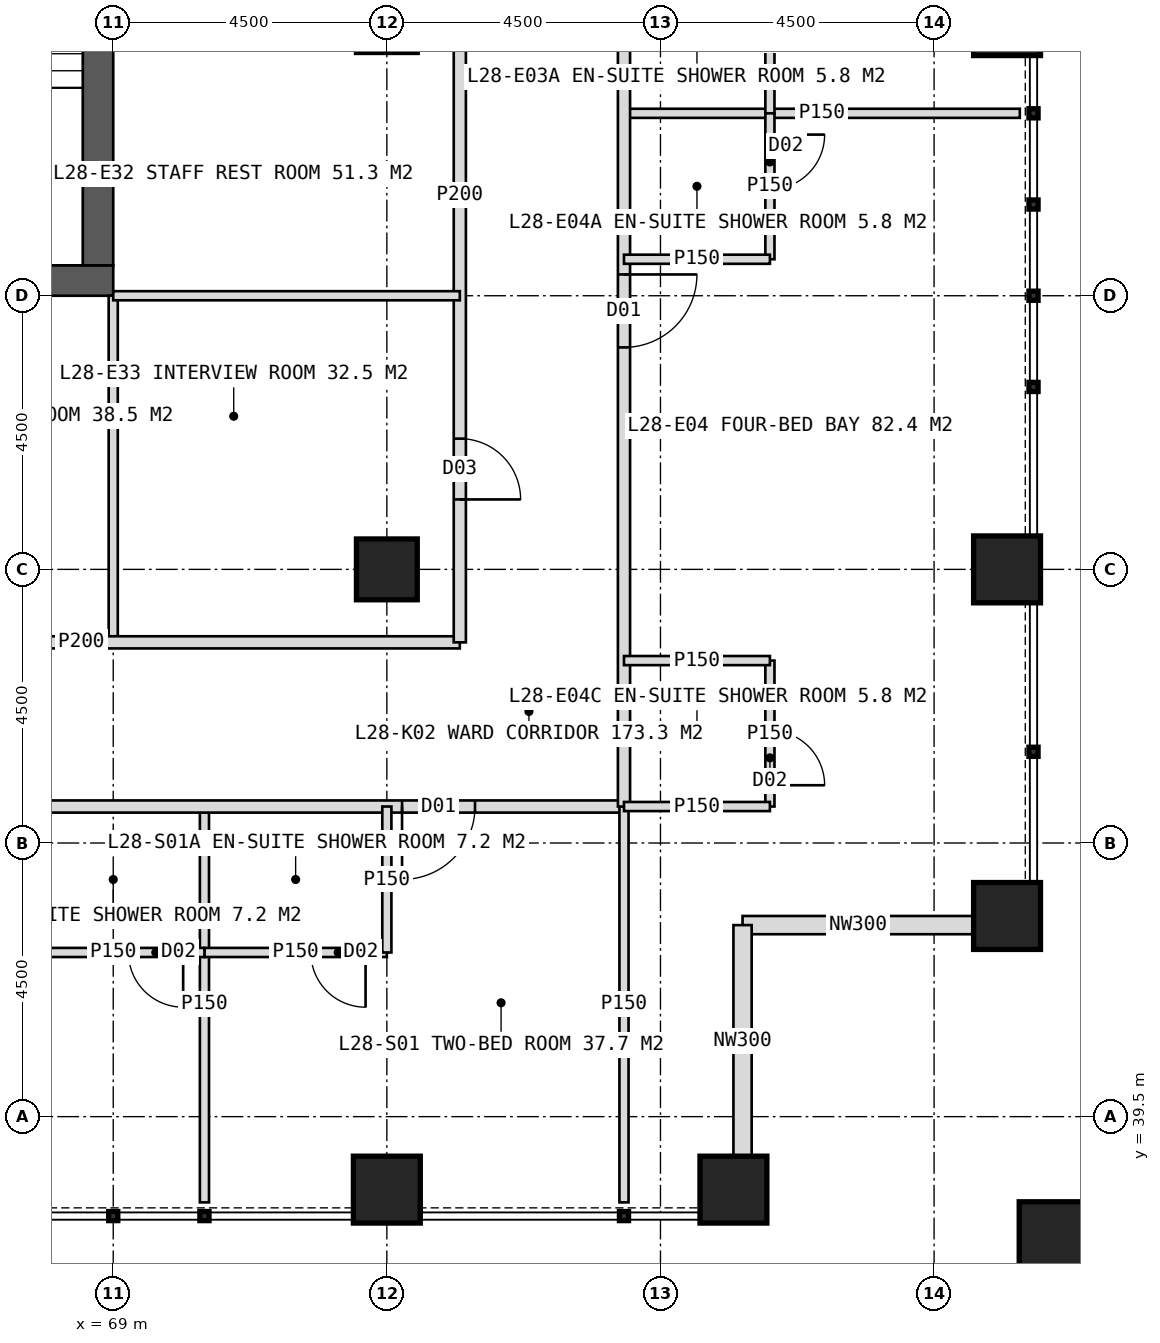
"""IFC4 building model, lengths in metres.
Left out: names, types, materials, properties, quantities, classifications, styles, units other than length and angle.
Written with IfcOpenShell. Run it as: python <this file> out.ifc"""

import sys

from ifc_helpers import new_model, si_unit, direction, frame, frame_2d, origin, origin_2d, place, context, subcontext, project, spatial, rectangle, hollow_rectangle, extrude, element, fill, save


model = new_model("IFC4")
c1 = context("Model", 3, precision=1e-05, world=origin(), true_north=direction((0.0, 1.0)))
c2 = subcontext(c1, "Body", "Model", "MODEL_VIEW")
j1 = project(units=[si_unit("LENGTHUNIT", "METRE"), si_unit("PLANEANGLEUNIT", "RADIAN")], contexts=[c1])
p1 = place(None, origin())
s1 = spatial("IfcSite", under=j1, at=p1, CompositionType="ELEMENT")
p2 = place(p1, origin())
s2 = spatial("IfcBuilding", under=s1, at=p2, CompositionType="ELEMENT")
p3 = place(p2, frame((0.0, 0.0, 120.0)))
s3 = spatial("IfcBuildingStorey", under=s2, at=p3, CompositionType="ELEMENT", Elevation=120.0)
p4 = place(p3, frame((51.0, 53.25, 0.0), z_axis=(0.0, 0.0, 1.0), x_axis=(1.0, 0.0, 0.0)))
e1 = element("IfcWall", 1, at=p4, inside=s3, PredefinedType="SHEAR", context=c2, shape_type="SweptSolid", body=[
    extrude(rectangle(XDim=18.0, YDim=0.5, at=frame_2d((9.0, 0.0))), origin(), (0.0, 0.0, 1.0), 4.0),
])
p5 = place(p4, frame((8.1, 0.0, 0.0)))
e2 = element("IfcOpeningElement", 2, at=p5, cuts=e1, PredefinedType="OPENING", context=c2, shape_type="SweptSolid", body=[
    extrude(rectangle(XDim=1.8, YDim=2.2, at=frame_2d((0.9, 1.1))), frame((0.0, 0.26, 0.0), z_axis=(0.0, -1.0, 0.0), x_axis=(1.0, 0.0, 0.0)), (0.0, 0.0, 1.0), 0.52),
])
p6 = place(p3, frame((68.75, 53.5, 0.0), z_axis=(0.0, 0.0, 1.0), x_axis=(0.0, 1.0, 0.0)))
e3 = element("IfcWall", 3, at=p6, inside=s3, PredefinedType="SHEAR", context=c2, shape_type="SweptSolid", body=[
    extrude(rectangle(XDim=17.0, YDim=0.5, at=frame_2d((8.5, 0.0))), origin(), (0.0, 0.0, 1.0), 4.0),
])
p7 = place(p6, frame((9.5, 0.0, 0.0)))
e4 = element("IfcOpeningElement", 4, at=p7, cuts=e3, PredefinedType="OPENING", context=c2, shape_type="SweptSolid", body=[
    extrude(rectangle(XDim=1.5, YDim=2.2, at=frame_2d((0.75, 1.1))), frame((0.0, 0.26, 0.0), z_axis=(0.0, -1.0, 0.0), x_axis=(1.0, 0.0, 0.0)), (0.0, 0.0, 1.0), 0.52),
])
p8 = place(p3, frame((73.5, 48.5, 0.0), z_axis=(0.0, 0.0, 1.0), x_axis=(1.0, 0.0, 0.0)))
e5 = element("IfcColumn", 5, at=p8, inside=s3, PredefinedType="COLUMN", context=c2, shape_type="SweptSolid", body=[
    extrude(hollow_rectangle(XDim=1.0, YDim=1.0, WallThickness=0.1, at=origin_2d()), origin(), (0.0, 0.0, 1.0), 4.0),
])
for number, where, z_axis, x_axis in (
    (6, (83.7, 42.8, 0.0), (0.0, 0.0, 1.0), (1.0, 0.0, 0.0)),
    (7, (83.7, 48.5, 0.0), (0.0, 0.0, 1.0), (1.0, 0.0, 0.0)),
    (8, (83.7, 57.5, 0.0), (0.0, 0.0, 1.0), (1.0, 0.0, 0.0)),
    (9, (73.5, 38.3, 0.0), (0.0, 0.0, 1.0), (1.0, 0.0, 0.0)),
    (10, (79.2, 38.3, 0.0), (0.0, 0.0, 1.0), (1.0, 0.0, 0.0)),
):
    element("IfcColumn", number, at=place(p3, frame(where, z_axis=z_axis, x_axis=x_axis)), inside=s3, PredefinedType="COLUMN", context=c2, shape_type="SweptSolid", body=[
        extrude(hollow_rectangle(XDim=1.1, YDim=1.1, WallThickness=0.1, at=origin_2d()), origin(), (0.0, 0.0, 1.0), 4.0),
    ])
p9 = place(p3, frame((84.6, 37.4, 0.0), z_axis=(0.0, 0.0, 1.0), x_axis=(1.0, 0.0, 0.0)))
e11 = element("IfcColumn", 11, at=p9, inside=s3, PredefinedType="COLUMN", context=c2, shape_type="SweptSolid", body=[
    extrude(hollow_rectangle(XDim=1.4, YDim=1.4, WallThickness=0.08, at=origin_2d()), origin(), (0.0, 0.0, 1.0), 4.0),
])
for number, where, z_axis, x_axis in (
    (12, (83.15, 42.65, 0.0), (0.0, 0.0, 1.0), (-1.0, 0.0, 0.0)),
    (13, (79.35, 42.65, 0.0), (0.0, 0.0, 1.0), (0.0, -1.0, 0.0)),
):
    element("IfcWall", number, at=place(p3, frame(where, z_axis=z_axis, x_axis=x_axis)), inside=s3, PredefinedType="ELEMENTEDWALL", context=c2, shape_type="SweptSolid", body=[
        extrude(rectangle(XDim=3.8, YDim=0.3, at=frame_2d((1.9, 0.0))), origin(), (0.0, 0.0, 1.0), 4.0),
    ])
p10 = place(p3, frame((70.5, 44.6, 0.0), z_axis=(0.0, 0.0, 1.0), x_axis=(0.0, -1.0, 0.0)))
e14 = element("IfcWall", 14, at=p10, inside=s3, PredefinedType="PARTITIONING", context=c2, shape_type="SweptSolid", body=[
    extrude(rectangle(XDim=6.51, YDim=0.15, at=frame_2d((3.255, 0.0))), origin(), (0.0, 0.0, 1.0), 3.75),
])
p11 = place(p3, frame((77.4, 44.6, 0.0), z_axis=(0.0, 0.0, 1.0), x_axis=(-1.0, 0.0, 0.0)))
e15 = element("IfcWall", 15, at=p11, inside=s3, PredefinedType="PARTITIONING", context=c2, shape_type="SweptSolid", body=[
    extrude(rectangle(XDim=34.8, YDim=0.2, at=frame_2d((17.4, 0.0))), origin(), (0.0, 0.0, 1.0), 3.75),
])
p12 = place(p11, frame((2.45, 0.0, 0.0)))
e16 = element("IfcOpeningElement", 16, at=p12, cuts=e15, PredefinedType="OPENING", context=c2, shape_type="SweptSolid", body=[
    extrude(rectangle(XDim=1.2, YDim=2.2, at=frame_2d((0.6, 1.1))), frame((0.0, 0.11, 0.0), z_axis=(0.0, -1.0, 0.0), x_axis=(1.0, 0.0, 0.0)), (0.0, 0.0, 1.0), 0.22),
])
p13 = place(p11, frame((10.15, 0.0, 0.0)))
e17 = element("IfcOpeningElement", 17, at=p13, cuts=e15, PredefinedType="OPENING", context=c2, shape_type="SweptSolid", body=[
    extrude(rectangle(XDim=1.2, YDim=2.2, at=frame_2d((0.6, 1.1))), frame((0.0, 0.11, 0.0), z_axis=(0.0, -1.0, 0.0), x_axis=(1.0, 0.0, 0.0)), (0.0, 0.0, 1.0), 0.22),
])
p14 = place(p11, frame((20.45, 0.0, 0.0)))
e18 = element("IfcOpeningElement", 18, at=p14, cuts=e15, PredefinedType="OPENING", context=c2, shape_type="SweptSolid", body=[
    extrude(rectangle(XDim=1.2, YDim=2.2, at=frame_2d((0.6, 1.1))), frame((0.0, 0.11, 0.0), z_axis=(0.0, -1.0, 0.0), x_axis=(1.0, 0.0, 0.0)), (0.0, 0.0, 1.0), 0.22),
])
p15 = place(p11, frame((27.55, 0.0, 0.0)))
e19 = element("IfcOpeningElement", 19, at=p15, cuts=e15, PredefinedType="OPENING", context=c2, shape_type="SweptSolid", body=[
    extrude(rectangle(XDim=1.2, YDim=2.2, at=frame_2d((0.6, 1.1))), frame((0.0, 0.11, 0.0), z_axis=(0.0, -1.0, 0.0), x_axis=(1.0, 0.0, 0.0)), (0.0, 0.0, 1.0), 0.22),
])
p16 = place(p3, frame((77.4, 44.6, 0.0), z_axis=(0.0, 0.0, 1.0), x_axis=(0.0, -1.0, 0.0)))
e20 = element("IfcWall", 20, at=p16, inside=s3, PredefinedType="PARTITIONING", context=c2, shape_type="SweptSolid", body=[
    extrude(rectangle(XDim=6.51, YDim=0.15, at=frame_2d((3.255, 0.0))), origin(), (0.0, 0.0, 1.0), 3.75),
])
p17 = place(p3, frame((73.5, 42.2, 0.0), z_axis=(0.0, 0.0, 1.0), x_axis=(-1.0, 0.0, 0.0)))
e21 = element("IfcWall", 21, at=p17, inside=s3, PredefinedType="PARTITIONING", context=c2, shape_type="SweptSolid", body=[
    extrude(rectangle(XDim=3.0, YDim=0.15, at=frame_2d((1.5, 0.0))), origin(), (0.0, 0.0, 1.0), 3.75),
])
p18 = place(p17, frame((0.35, 0.0, 0.0)))
e22 = element("IfcOpeningElement", 22, at=p18, cuts=e21, PredefinedType="OPENING", context=c2, shape_type="SweptSolid", body=[
    extrude(rectangle(XDim=0.9, YDim=2.1, at=frame_2d((0.45, 1.05))), frame((0.0, 0.085, 0.0), z_axis=(0.0, -1.0, 0.0), x_axis=(1.0, 0.0, 0.0)), (0.0, 0.0, 1.0), 0.17),
])
p19 = place(p3, frame((73.5, 44.6, 0.0), z_axis=(0.0, 0.0, 1.0), x_axis=(0.0, -1.0, 0.0)))
e23 = element("IfcWall", 23, at=p19, inside=s3, PredefinedType="PARTITIONING", context=c2, shape_type="SweptSolid", body=[
    extrude(rectangle(XDim=2.4, YDim=0.15, at=frame_2d((1.2, 0.0))), origin(), (0.0, 0.0, 1.0), 2.95),
])
p20 = place(p3, frame((70.5, 42.2, 0.0), z_axis=(0.0, 0.0, 1.0), x_axis=(-1.0, 0.0, 0.0)))
e24 = element("IfcWall", 24, at=p20, inside=s3, PredefinedType="PARTITIONING", context=c2, shape_type="SweptSolid", body=[
    extrude(rectangle(XDim=3.0, YDim=0.15, at=frame_2d((1.5, 0.0))), origin(), (0.0, 0.0, 1.0), 3.75),
])
p21 = place(p20, frame((0.35, 0.0, 0.0)))
e25 = element("IfcOpeningElement", 25, at=p21, cuts=e24, PredefinedType="OPENING", context=c2, shape_type="SweptSolid", body=[
    extrude(rectangle(XDim=0.9, YDim=2.1, at=frame_2d((0.45, 1.05))), frame((0.0, 0.085, 0.0), z_axis=(0.0, -1.0, 0.0), x_axis=(1.0, 0.0, 0.0)), (0.0, 0.0, 1.0), 0.17),
])
p22 = place(p3, frame((69.0, 53.0, 0.0), z_axis=(0.0, 0.0, 1.0), x_axis=(0.0, -1.0, 0.0)))
e26 = element("IfcWall", 26, at=p22, inside=s3, PredefinedType="PARTITIONING", context=c2, shape_type="SweptSolid", body=[
    extrude(rectangle(XDim=5.7, YDim=0.15, at=frame_2d((2.85, 0.0))), origin(), (0.0, 0.0, 1.0), 3.75),
])
p23 = place(p3, frame((74.7, 47.3, 0.0), z_axis=(0.0, 0.0, 1.0), x_axis=(-1.0, 0.0, 0.0)))
e27 = element("IfcWall", 27, at=p23, inside=s3, PredefinedType="PARTITIONING", context=c2, shape_type="SweptSolid", body=[
    extrude(rectangle(XDim=12.45, YDim=0.2, at=frame_2d((6.225, 0.0))), origin(), (0.0, 0.0, 1.0), 3.75),
])
p24 = place(p23, frame((7.15, 0.0, 0.0)))
e28 = element("IfcOpeningElement", 28, at=p24, cuts=e27, PredefinedType="OPENING", context=c2, shape_type="SweptSolid", body=[
    extrude(rectangle(XDim=1.0, YDim=2.1, at=frame_2d((0.5, 1.05))), frame((0.0, 0.11, 0.0), z_axis=(0.0, -1.0, 0.0), x_axis=(1.0, 0.0, 0.0)), (0.0, 0.0, 1.0), 0.22),
])
p25 = place(p3, frame((77.4, 56.0, 0.0), z_axis=(0.0, 0.0, 1.0), x_axis=(1.0, 0.0, 0.0)))
e29 = element("IfcWall", 29, at=p25, inside=s3, PredefinedType="PARTITIONING", context=c2, shape_type="SweptSolid", body=[
    extrude(rectangle(XDim=6.51, YDim=0.15, at=frame_2d((3.255, 0.0))), origin(), (0.0, 0.0, 1.0), 3.75),
])
p26 = place(p3, frame((77.4, 79.4, 0.0), z_axis=(0.0, 0.0, 1.0), x_axis=(0.0, -1.0, 0.0)))
e30 = element("IfcWall", 30, at=p26, inside=s3, PredefinedType="PARTITIONING", context=c2, shape_type="SweptSolid", body=[
    extrude(rectangle(XDim=34.8, YDim=0.2, at=frame_2d((17.4, 0.0))), origin(), (0.0, 0.0, 1.0), 3.75),
])
p27 = place(p26, frame((2.45, 0.0, 0.0)))
e31 = element("IfcOpeningElement", 31, at=p27, cuts=e30, PredefinedType="OPENING", context=c2, shape_type="SweptSolid", body=[
    extrude(rectangle(XDim=1.2, YDim=2.2, at=frame_2d((0.6, 1.1))), frame((0.0, 0.11, 0.0), z_axis=(0.0, -1.0, 0.0), x_axis=(1.0, 0.0, 0.0)), (0.0, 0.0, 1.0), 0.22),
])
p28 = place(p26, frame((10.15, 0.0, 0.0)))
e32 = element("IfcOpeningElement", 32, at=p28, cuts=e30, PredefinedType="OPENING", context=c2, shape_type="SweptSolid", body=[
    extrude(rectangle(XDim=1.2, YDim=2.2, at=frame_2d((0.6, 1.1))), frame((0.0, 0.11, 0.0), z_axis=(0.0, -1.0, 0.0), x_axis=(1.0, 0.0, 0.0)), (0.0, 0.0, 1.0), 0.22),
])
p29 = place(p26, frame((19.55, 0.0, 0.0)))
e33 = element("IfcOpeningElement", 33, at=p29, cuts=e30, PredefinedType="OPENING", context=c2, shape_type="SweptSolid", body=[
    extrude(rectangle(XDim=1.2, YDim=2.2, at=frame_2d((0.6, 1.1))), frame((0.0, 0.11, 0.0), z_axis=(0.0, -1.0, 0.0), x_axis=(1.0, 0.0, 0.0)), (0.0, 0.0, 1.0), 0.22),
])
p30 = place(p26, frame((26.05, 0.0, 0.0)))
e34 = element("IfcOpeningElement", 34, at=p30, cuts=e30, PredefinedType="OPENING", context=c2, shape_type="SweptSolid", body=[
    extrude(rectangle(XDim=1.2, YDim=2.2, at=frame_2d((0.6, 1.1))), frame((0.0, 0.11, 0.0), z_axis=(0.0, -1.0, 0.0), x_axis=(1.0, 0.0, 0.0)), (0.0, 0.0, 1.0), 0.22),
])
p31 = place(p3, frame((79.8, 58.4, 0.0), z_axis=(0.0, 0.0, 1.0), x_axis=(0.0, -1.0, 0.0)))
e35 = element("IfcWall", 35, at=p31, inside=s3, PredefinedType="PARTITIONING", context=c2, shape_type="SweptSolid", body=[
    extrude(rectangle(XDim=2.4, YDim=0.15, at=frame_2d((1.2, 0.0))), origin(), (0.0, 0.0, 1.0), 3.75),
])
p32 = place(p31, frame((0.35, 0.0, 0.0)))
e36 = element("IfcOpeningElement", 36, at=p32, cuts=e35, PredefinedType="OPENING", context=c2, shape_type="SweptSolid", body=[
    extrude(rectangle(XDim=0.9, YDim=2.1, at=frame_2d((0.45, 1.05))), frame((0.0, 0.085, 0.0), z_axis=(0.0, -1.0, 0.0), x_axis=(1.0, 0.0, 0.0)), (0.0, 0.0, 1.0), 0.17),
])
p33 = place(p3, frame((79.8, 56.0, 0.0), z_axis=(0.0, 0.0, 1.0), x_axis=(0.0, -1.0, 0.0)))
e37 = element("IfcWall", 37, at=p33, inside=s3, PredefinedType="PARTITIONING", context=c2, shape_type="SweptSolid", body=[
    extrude(rectangle(XDim=2.4, YDim=0.15, at=frame_2d((1.2, 0.0))), origin(), (0.0, 0.0, 1.0), 3.75),
])
p34 = place(p33, frame((0.35, 0.0, 0.0)))
e38 = element("IfcOpeningElement", 38, at=p34, cuts=e37, PredefinedType="OPENING", context=c2, shape_type="SweptSolid", body=[
    extrude(rectangle(XDim=0.9, YDim=2.1, at=frame_2d((0.45, 1.05))), frame((0.0, 0.085, 0.0), z_axis=(0.0, -1.0, 0.0), x_axis=(1.0, 0.0, 0.0)), (0.0, 0.0, 1.0), 0.17),
])
p35 = place(p3, frame((77.4, 53.6, 0.0), z_axis=(0.0, 0.0, 1.0), x_axis=(1.0, 0.0, 0.0)))
e39 = element("IfcWall", 39, at=p35, inside=s3, PredefinedType="PARTITIONING", context=c2, shape_type="SweptSolid", body=[
    extrude(rectangle(XDim=2.4, YDim=0.15, at=frame_2d((1.2, 0.0))), origin(), (0.0, 0.0, 1.0), 3.75),
])
p36 = place(p3, frame((79.8, 47.0, 0.0), z_axis=(0.0, 0.0, 1.0), x_axis=(0.0, -1.0, 0.0)))
e40 = element("IfcWall", 40, at=p36, inside=s3, PredefinedType="PARTITIONING", context=c2, shape_type="SweptSolid", body=[
    extrude(rectangle(XDim=2.4, YDim=0.15, at=frame_2d((1.2, 0.0))), origin(), (0.0, 0.0, 1.0), 3.75),
])
p37 = place(p36, frame((1.15, 0.0, 0.0)))
e41 = element("IfcOpeningElement", 41, at=p37, cuts=e40, PredefinedType="OPENING", context=c2, shape_type="SweptSolid", body=[
    extrude(rectangle(XDim=0.9, YDim=2.1, at=frame_2d((0.45, 1.05))), frame((0.0, 0.085, 0.0), z_axis=(0.0, -1.0, 0.0), x_axis=(1.0, 0.0, 0.0)), (0.0, 0.0, 1.0), 0.17),
])
for number, where, z_axis, x_axis in (
    (42, (77.4, 47.0, 0.0), (0.0, 0.0, 1.0), (1.0, 0.0, 0.0)),
    (43, (77.4, 44.6, 0.0), (0.0, 0.0, 1.0), (1.0, 0.0, 0.0)),
):
    element("IfcWall", number, at=place(p3, frame(where, z_axis=z_axis, x_axis=x_axis)), inside=s3, PredefinedType="PARTITIONING", context=c2, shape_type="SweptSolid", body=[
        extrude(rectangle(XDim=2.4, YDim=0.15, at=frame_2d((1.2, 0.0))), origin(), (0.0, 0.0, 1.0), 3.75),
    ])
p38 = place(p3, frame((74.7, 62.0, 0.0), z_axis=(0.0, 0.0, 1.0), x_axis=(0.0, -1.0, 0.0)))
e44 = element("IfcWall", 44, at=p38, inside=s3, PredefinedType="PARTITIONING", context=c2, shape_type="SweptSolid", body=[
    extrude(rectangle(XDim=14.7, YDim=0.2, at=frame_2d((7.35, 0.0))), origin(), (0.0, 0.0, 1.0), 3.75),
])
p39 = place(p38, frame((1.45, 0.0, 0.0)))
e45 = element("IfcOpeningElement", 45, at=p39, cuts=e44, PredefinedType="OPENING", context=c2, shape_type="SweptSolid", body=[
    extrude(rectangle(XDim=1.0, YDim=2.1, at=frame_2d((0.5, 1.05))), frame((0.0, 0.11, 0.0), z_axis=(0.0, -1.0, 0.0), x_axis=(1.0, 0.0, 0.0)), (0.0, 0.0, 1.0), 0.22),
])
p40 = place(p38, frame((11.35, 0.0, 0.0)))
e46 = element("IfcOpeningElement", 46, at=p40, cuts=e44, PredefinedType="OPENING", context=c2, shape_type="SweptSolid", body=[
    extrude(rectangle(XDim=1.0, YDim=2.1, at=frame_2d((0.5, 1.05))), frame((0.0, 0.11, 0.0), z_axis=(0.0, -1.0, 0.0), x_axis=(1.0, 0.0, 0.0)), (0.0, 0.0, 1.0), 0.22),
])
p41 = place(p3, frame((69.0, 53.0, 0.0), z_axis=(0.0, 0.0, 1.0), x_axis=(1.0, 0.0, 0.0)))
e47 = element("IfcWall", 47, at=p41, inside=s3, PredefinedType="PARTITIONING", context=c2, shape_type="SweptSolid", body=[
    extrude(rectangle(XDim=5.7, YDim=0.15, at=frame_2d((2.85, 0.0))), origin(), (0.0, 0.0, 1.0), 3.75),
])
p42 = place(p12, origin())
e48 = element("IfcDoor", 48, at=p42, inside=s3, OperationType="SINGLE_SWING_RIGHT", PredefinedType="DOOR", context=c2, shape_type="SweptSolid", body=[
    extrude(rectangle(XDim=1.2, YDim=2.2, at=frame_2d((0.6, 1.1))), frame((0.0, 0.025, 0.0), z_axis=(0.0, -1.0, 0.0), x_axis=(1.0, 0.0, 0.0)), (0.0, 0.0, 1.0), 0.05),
])
fill(e16, e48)
p43 = place(p18, origin())
e49 = element("IfcDoor", 49, at=p43, inside=s3, OperationType="SINGLE_SWING_LEFT", PredefinedType="DOOR", context=c2, shape_type="SweptSolid", body=[
    extrude(rectangle(XDim=0.9, YDim=2.1, at=frame_2d((0.45, 1.05))), frame((0.0, 0.025, 0.0), z_axis=(0.0, -1.0, 0.0), x_axis=(1.0, 0.0, 0.0)), (0.0, 0.0, 1.0), 0.05),
])
fill(e22, e49)
p44 = place(p21, origin())
e50 = element("IfcDoor", 50, at=p44, inside=s3, OperationType="SINGLE_SWING_LEFT", PredefinedType="DOOR", context=c2, shape_type="SweptSolid", body=[
    extrude(rectangle(XDim=0.9, YDim=2.1, at=frame_2d((0.45, 1.05))), frame((0.0, 0.025, 0.0), z_axis=(0.0, -1.0, 0.0), x_axis=(1.0, 0.0, 0.0)), (0.0, 0.0, 1.0), 0.05),
])
fill(e25, e50)
p45 = place(p30, origin())
e51 = element("IfcDoor", 51, at=p45, inside=s3, OperationType="SINGLE_SWING_LEFT", PredefinedType="DOOR", context=c2, shape_type="SweptSolid", body=[
    extrude(rectangle(XDim=1.2, YDim=2.2, at=frame_2d((0.6, 1.1))), frame((0.0, 0.025, 0.0), z_axis=(0.0, -1.0, 0.0), x_axis=(1.0, 0.0, 0.0)), (0.0, 0.0, 1.0), 0.05),
])
fill(e34, e51)
p46 = place(p34, origin())
e52 = element("IfcDoor", 52, at=p46, inside=s3, OperationType="SINGLE_SWING_LEFT", PredefinedType="DOOR", context=c2, shape_type="SweptSolid", body=[
    extrude(rectangle(XDim=0.9, YDim=2.1, at=frame_2d((0.45, 1.05))), frame((0.0, 0.025, 0.0), z_axis=(0.0, -1.0, 0.0), x_axis=(1.0, 0.0, 0.0)), (0.0, 0.0, 1.0), 0.05),
])
fill(e38, e52)
p47 = place(p37, origin())
e53 = element("IfcDoor", 53, at=p47, inside=s3, OperationType="SINGLE_SWING_RIGHT", PredefinedType="DOOR", context=c2, shape_type="SweptSolid", body=[
    extrude(rectangle(XDim=0.9, YDim=2.1, at=frame_2d((0.45, 1.05))), frame((0.0, 0.025, 0.0), z_axis=(0.0, -1.0, 0.0), x_axis=(1.0, 0.0, 0.0)), (0.0, 0.0, 1.0), 0.05),
])
fill(e41, e53)
p48 = place(p40, origin())
e54 = element("IfcDoor", 54, at=p48, inside=s3, OperationType="SINGLE_SWING_RIGHT", PredefinedType="DOOR", context=c2, shape_type="SweptSolid", body=[
    extrude(rectangle(XDim=1.0, YDim=2.1, at=frame_2d((0.5, 1.05))), frame((0.0, 0.025, 0.0), z_axis=(0.0, -1.0, 0.0), x_axis=(1.0, 0.0, 0.0)), (0.0, 0.0, 1.0), 0.05),
])
fill(e46, e54)
save(model, sys.argv[1])
